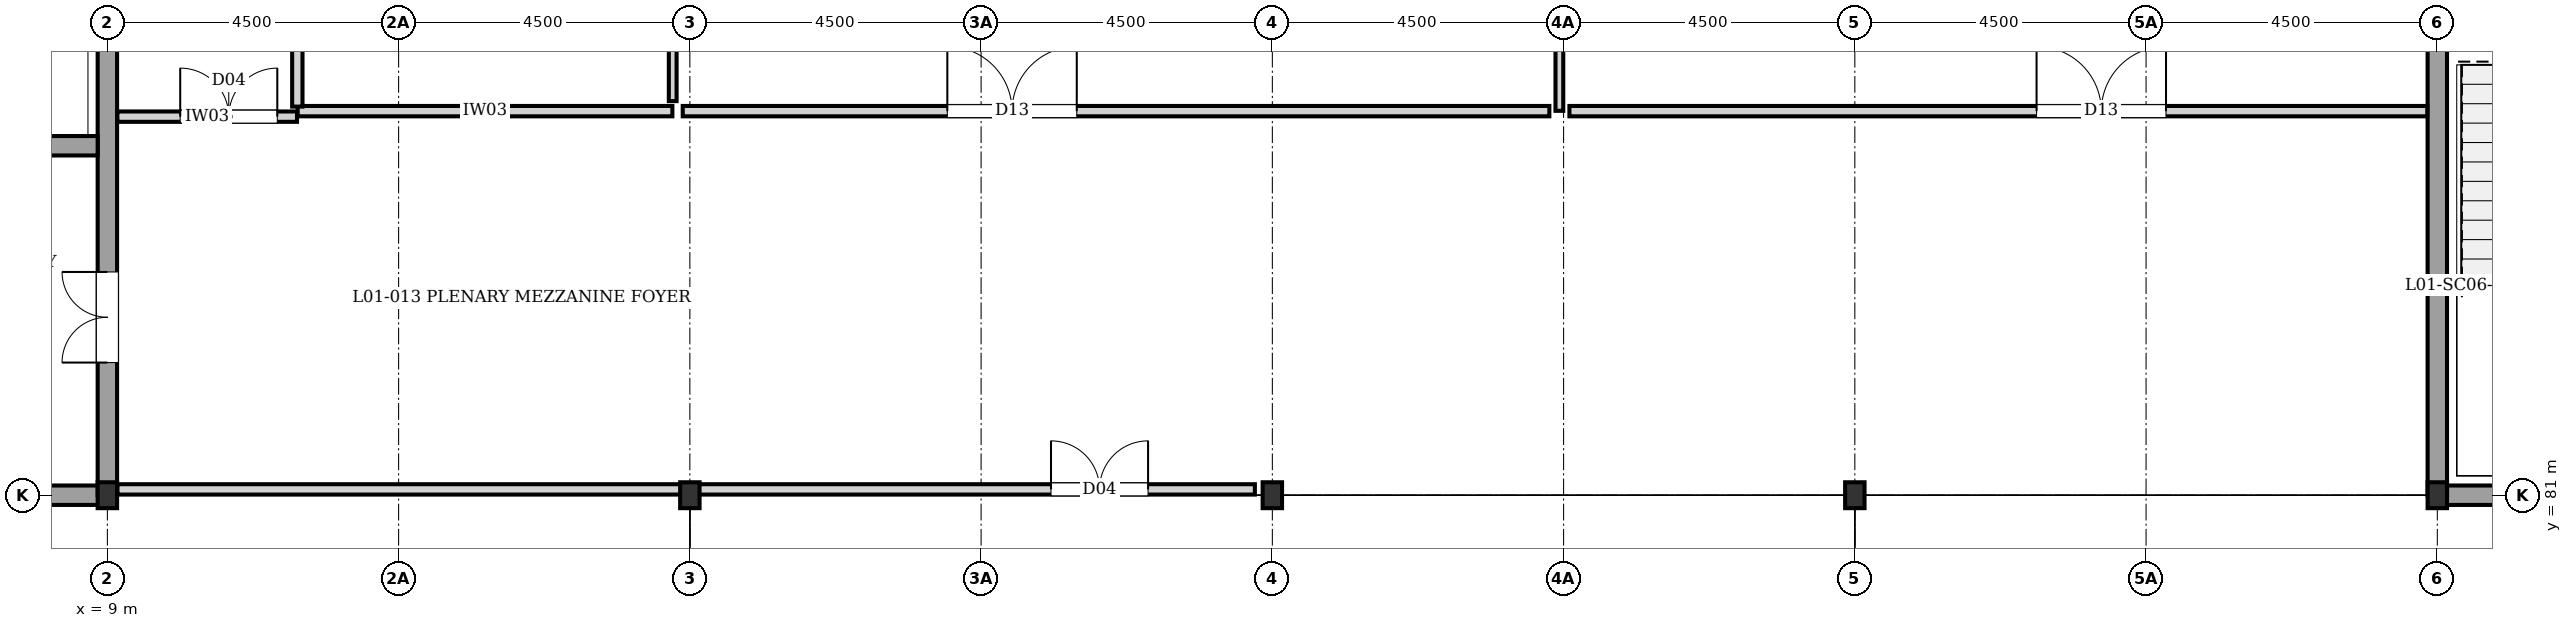
"""IFC4 building model, lengths in metres.
Left out: names, types, materials, properties, quantities, classifications, styles, units other than length and angle.
Written with IfcOpenShell. Run it as: python <this file> out.ifc"""

import sys

from ifc_helpers import new_model, si_unit, direction, frame, frame_2d, origin, origin_2d, place, context, subcontext, project, spatial, rectangle, i_section, extrude, element, fill, save


model = new_model("IFC4")
c1 = context("Model", 3, precision=1e-05, world=origin(), true_north=direction((0.0, 1.0)))
c2 = subcontext(c1, "Body", "Model", "MODEL_VIEW")
j1 = project(units=[si_unit("LENGTHUNIT", "METRE"), si_unit("PLANEANGLEUNIT", "RADIAN")], contexts=[c1])
p1 = place(None, origin())
s1 = spatial("IfcSite", under=j1, at=p1, CompositionType="ELEMENT")
p2 = place(p1, origin())
s2 = spatial("IfcBuilding", under=s1, at=p2, CompositionType="ELEMENT")
p3 = place(p2, frame((0.0, 0.0, 4.32)))
s3 = spatial("IfcBuildingStorey", under=s2, at=p3, CompositionType="ELEMENT", Elevation=4.32)
for number, where, z_axis, x_axis in (
    (1, (9.0, 81.0, 0.0), (0.0, 0.0, 1.0), (1.0, 0.0, 0.0)),
    (2, (18.0, 81.0, 0.0), (0.0, 0.0, 1.0), (1.0, 0.0, 0.0)),
    (3, (27.0, 81.0, 0.0), (0.0, 0.0, 1.0), (1.0, 0.0, 0.0)),
    (4, (36.0, 81.0, 0.0), (0.0, 0.0, 1.0), (1.0, 0.0, 0.0)),
    (5, (45.0, 81.0, 0.0), (0.0, 0.0, 1.0), (1.0, 0.0, 0.0)),
):
    element("IfcColumn", number, at=place(p3, frame(where, z_axis=z_axis, x_axis=x_axis)), inside=s3, PredefinedType="COLUMN", context=c2, shape_type="SweptSolid", body=[
        extrude(i_section(OverallWidth=0.3, OverallDepth=0.4, WebThickness=0.013, FlangeThickness=0.024, at=origin_2d()), origin(), (0.0, 0.0, 1.0), 3.84),
    ])
p4 = place(p3, frame((0.0, 81.0, 0.0), z_axis=(0.0, 0.0, 1.0), x_axis=(1.0, 0.0, 0.0)))
e6 = element("IfcWall", 6, at=p4, inside=s3, PredefinedType="SHEAR", context=c2, shape_type="SweptSolid", body=[
    extrude(rectangle(XDim=9.0, YDim=0.3, at=frame_2d((4.5, 0.0))), origin(), (0.0, 0.0, 1.0), 3.6),
])
p5 = place(p3, frame((9.0, 81.0, 0.0), z_axis=(0.0, 0.0, 1.0), x_axis=(0.0, 1.0, 0.0)))
e7 = element("IfcWall", 7, at=p5, inside=s3, PredefinedType="SHEAR", context=c2, shape_type="SweptSolid", body=[
    extrude(rectangle(XDim=9.0, YDim=0.3, at=frame_2d((4.5, 0.0))), origin(), (0.0, 0.0, 1.0), 3.6),
])
p6 = place(p5, frame((2.05, 0.0, 0.0)))
e8 = element("IfcOpeningElement", 8, at=p6, cuts=e7, PredefinedType="OPENING", context=c2, shape_type="SweptSolid", body=[
    extrude(rectangle(XDim=1.4, YDim=2.02, at=frame_2d((0.7, 1.01))), frame((0.0, 0.16, 0.0), z_axis=(0.0, -1.0, 0.0), x_axis=(1.0, 0.0, 0.0)), (0.0, 0.0, 1.0), 0.32),
])
p7 = place(p3, frame((4.65, 86.4, 0.0), z_axis=(0.0, 0.0, 1.0), x_axis=(1.0, 0.0, 0.0)))
e9 = element("IfcWall", 9, at=p7, inside=s3, PredefinedType="SHEAR", context=c2, shape_type="SweptSolid", body=[
    extrude(rectangle(XDim=4.2, YDim=0.3, at=frame_2d((2.1, 0.0))), origin(), (0.0, 0.0, 1.0), 3.6),
])
p8 = place(p7, frame((1.5, 0.0, 0.0)))
e10 = element("IfcOpeningElement", 10, at=p8, cuts=e9, PredefinedType="OPENING", context=c2, shape_type="SweptSolid", body=[
    extrude(rectangle(XDim=1.2, YDim=2.2, at=frame_2d((0.6, 1.1))), frame((0.0, 0.16, 0.0), z_axis=(0.0, -1.0, 0.0), x_axis=(1.0, 0.0, 0.0)), (0.0, 0.0, 1.0), 0.32),
])
for number, where, z_axis, x_axis in (
    (11, (45.0, 81.0, 0.0), (0.0, 0.0, 1.0), (1.0, 0.0, 0.0)),
    (12, (45.0, 81.0, 0.0), (0.0, 0.0, 1.0), (0.0, 1.0, 0.0)),
):
    element("IfcWall", number, at=place(p3, frame(where, z_axis=z_axis, x_axis=x_axis)), inside=s3, PredefinedType="SHEAR", context=c2, shape_type="SweptSolid", body=[
        extrude(rectangle(XDim=9.0, YDim=0.3, at=frame_2d((4.5, 0.0))), origin(), (0.0, 0.0, 1.0), 3.6),
    ])
p9 = place(p3, frame((11.94, 86.935, 0.0), z_axis=(0.0, 0.0, 1.0), x_axis=(1.0, 0.0, 0.0)))
e13 = element("IfcWall", 13, at=p9, inside=s3, PredefinedType="PARTITIONING", context=c2, shape_type="SweptSolid", body=[
    extrude(rectangle(XDim=5.79, YDim=0.16, at=frame_2d((2.895, 0.0))), origin(), (0.0, 0.0, 1.0), 3.6),
])
p10 = place(p3, frame((17.735, 87.09, 0.0), z_axis=(0.0, 0.0, 1.0), x_axis=(0.0, 1.0, 0.0)))
e14 = element("IfcWall", 14, at=p10, inside=s3, PredefinedType="PARTITIONING", context=c2, shape_type="SweptSolid", body=[
    extrude(rectangle(XDim=4.19, YDim=0.12, at=frame_2d((2.095, 0.0))), origin(), (0.0, 0.0, 1.0), 3.6),
])
p11 = place(p3, frame((31.435, 86.94, 0.0), z_axis=(0.0, 0.0, 1.0), x_axis=(0.0, 1.0, 0.0)))
e15 = element("IfcWall", 15, at=p11, inside=s3, PredefinedType="PARTITIONING", context=c2, shape_type="SweptSolid", body=[
    extrude(rectangle(XDim=4.34, YDim=0.12, at=frame_2d((2.17, 0.0))), origin(), (0.0, 0.0, 1.0), 3.6),
])
p12 = place(p3, frame((9.155, 86.85, 0.0), z_axis=(0.0, 0.0, 1.0), x_axis=(1.0, 0.0, 0.0)))
e16 = element("IfcWall", 16, at=p12, inside=s3, PredefinedType="PARTITIONING", context=c2, shape_type="SweptSolid", body=[
    extrude(rectangle(XDim=2.775, YDim=0.16, at=frame_2d((1.387, 0.0))), origin(), (0.0, 0.0, 1.0), 3.6),
])
p13 = place(p12, frame((0.97, 0.0, 0.0)))
e17 = element("IfcOpeningElement", 17, at=p13, cuts=e16, PredefinedType="OPENING", context=c2, shape_type="SweptSolid", body=[
    extrude(rectangle(XDim=1.5, YDim=2.1, at=frame_2d((0.75, 1.05))), frame((0.0, 0.09, 0.0), z_axis=(0.0, -1.0, 0.0), x_axis=(1.0, 0.0, 0.0)), (0.0, 0.0, 1.0), 0.18),
])
p14 = place(p3, frame((17.89, 86.935, 0.0), z_axis=(0.0, 0.0, 1.0), x_axis=(1.0, 0.0, 0.0)))
e18 = element("IfcWall", 18, at=p14, inside=s3, PredefinedType="PARTITIONING", context=c2, shape_type="SweptSolid", body=[
    extrude(rectangle(XDim=13.39, YDim=0.16, at=frame_2d((6.695, 0.0))), origin(), (0.0, 0.0, 1.0), 3.6),
])
p15 = place(p14, frame((4.088, 0.0, 0.0)))
e19 = element("IfcOpeningElement", 19, at=p15, cuts=e18, PredefinedType="OPENING", context=c2, shape_type="SweptSolid", body=[
    extrude(rectangle(XDim=2.0, YDim=2.35, at=frame_2d((1.0, 1.175))), frame((0.0, 0.09, 0.0), z_axis=(0.0, -1.0, 0.0), x_axis=(1.0, 0.0, 0.0)), (0.0, 0.0, 1.0), 0.18),
])
p16 = place(p3, frame((31.59, 86.935, 0.0), z_axis=(0.0, 0.0, 1.0), x_axis=(1.0, 0.0, 0.0)))
e20 = element("IfcWall", 20, at=p16, inside=s3, PredefinedType="PARTITIONING", context=c2, shape_type="SweptSolid", body=[
    extrude(rectangle(XDim=13.255, YDim=0.16, at=frame_2d((6.627, 0.0))), origin(), (0.0, 0.0, 1.0), 3.6),
])
p17 = place(p16, frame((7.218, 0.0, 0.0)))
e21 = element("IfcOpeningElement", 21, at=p17, cuts=e20, PredefinedType="OPENING", context=c2, shape_type="SweptSolid", body=[
    extrude(rectangle(XDim=2.0, YDim=2.35, at=frame_2d((1.0, 1.175))), frame((0.0, 0.09, 0.0), z_axis=(0.0, -1.0, 0.0), x_axis=(1.0, 0.0, 0.0)), (0.0, 0.0, 1.0), 0.18),
])
p18 = place(p3, frame((9.155, 81.09, 0.0), z_axis=(0.0, 0.0, 1.0), x_axis=(1.0, 0.0, 0.0)))
e22 = element("IfcWall", 22, at=p18, inside=s3, PredefinedType="PARTITIONING", context=c2, shape_type="SweptSolid", body=[
    extrude(rectangle(XDim=8.825, YDim=0.16, at=frame_2d((4.413, 0.0))), origin(), (0.0, 0.0, 1.0), 3.35),
])
p19 = place(p3, frame((11.935, 87.005, 0.0), z_axis=(0.0, 0.0, 1.0), x_axis=(0.0, 1.0, 0.0)))
e23 = element("IfcWall", 23, at=p19, inside=s3, PredefinedType="PARTITIONING", context=c2, shape_type="SweptSolid", body=[
    extrude(rectangle(XDim=26.78, YDim=0.16, at=frame_2d((13.39, 0.0))), origin(), (0.0, 0.0, 1.0), 3.6),
])
p20 = place(p19, frame((15.604, 0.0, 0.0)))
e24 = element("IfcOpeningElement", 24, at=p20, cuts=e23, PredefinedType="OPENING", context=c2, shape_type="SweptSolid", body=[
    extrude(rectangle(XDim=2.0, YDim=2.35, at=frame_2d((1.0, 1.175))), frame((0.0, 0.09, 0.0), z_axis=(0.0, -1.0, 0.0), x_axis=(1.0, 0.0, 0.0)), (0.0, 0.0, 1.0), 0.18),
])
p21 = place(p3, frame((17.98, 81.09, 0.0), z_axis=(0.0, 0.0, 1.0), x_axis=(1.0, 0.0, 0.0)))
e25 = element("IfcWall", 25, at=p21, inside=s3, PredefinedType="PARTITIONING", context=c2, shape_type="SweptSolid", body=[
    extrude(rectangle(XDim=8.75, YDim=0.16, at=frame_2d((4.375, 0.0))), origin(), (0.0, 0.0, 1.0), 3.28),
])
p22 = place(p21, frame((5.6, 0.0, 0.0)))
e26 = element("IfcOpeningElement", 26, at=p22, cuts=e25, PredefinedType="OPENING", context=c2, shape_type="SweptSolid", body=[
    extrude(rectangle(XDim=1.5, YDim=2.1, at=frame_2d((0.75, 1.05))), frame((0.0, 0.09, 0.0), z_axis=(0.0, -1.0, 0.0), x_axis=(1.0, 0.0, 0.0)), (0.0, 0.0, 1.0), 0.18),
])
p23 = place(p6, origin())
e27 = element("IfcDoor", 27, at=p23, inside=s3, OperationType="DOUBLE_DOOR_SINGLE_SWING", PredefinedType="DOOR", context=c2, shape_type="SweptSolid", body=[
    extrude(rectangle(XDim=1.4, YDim=2.02, at=frame_2d((0.7, 1.01))), frame((0.0, 0.025, 0.0), z_axis=(0.0, -1.0, 0.0), x_axis=(1.0, 0.0, 0.0)), (0.0, 0.0, 1.0), 0.05),
])
fill(e8, e27)
p24 = place(p13, origin())
e28 = element("IfcDoor", 28, at=p24, inside=s3, OperationType="DOUBLE_DOOR_SINGLE_SWING", PredefinedType="DOOR", context=c2, shape_type="SweptSolid", body=[
    extrude(rectangle(XDim=1.5, YDim=2.1, at=frame_2d((0.75, 1.05))), frame((0.0, 0.025, 0.0), z_axis=(0.0, -1.0, 0.0), x_axis=(1.0, 0.0, 0.0)), (0.0, 0.0, 1.0), 0.05),
])
fill(e17, e28)
p25 = place(p15, origin())
e29 = element("IfcDoor", 29, at=p25, inside=s3, OperationType="DOUBLE_DOOR_SINGLE_SWING", PredefinedType="DOOR", context=c2, shape_type="SweptSolid", body=[
    extrude(rectangle(XDim=2.0, YDim=2.35, at=frame_2d((1.0, 1.175))), frame((0.0, 0.025, 0.0), z_axis=(0.0, -1.0, 0.0), x_axis=(1.0, 0.0, 0.0)), (0.0, 0.0, 1.0), 0.05),
])
fill(e19, e29)
p26 = place(p17, origin())
e30 = element("IfcDoor", 30, at=p26, inside=s3, OperationType="DOUBLE_DOOR_SINGLE_SWING", PredefinedType="DOOR", context=c2, shape_type="SweptSolid", body=[
    extrude(rectangle(XDim=2.0, YDim=2.35, at=frame_2d((1.0, 1.175))), frame((0.0, 0.025, 0.0), z_axis=(0.0, -1.0, 0.0), x_axis=(1.0, 0.0, 0.0)), (0.0, 0.0, 1.0), 0.05),
])
fill(e21, e30)
p27 = place(p22, origin())
e31 = element("IfcDoor", 31, at=p27, inside=s3, OperationType="DOUBLE_DOOR_SINGLE_SWING", PredefinedType="DOOR", context=c2, shape_type="SweptSolid", body=[
    extrude(rectangle(XDim=1.5, YDim=2.1, at=frame_2d((0.75, 1.05))), frame((0.0, 0.025, 0.0), z_axis=(0.0, -1.0, 0.0), x_axis=(1.0, 0.0, 0.0)), (0.0, 0.0, 1.0), 0.05),
])
fill(e26, e31)
save(model, sys.argv[1])
